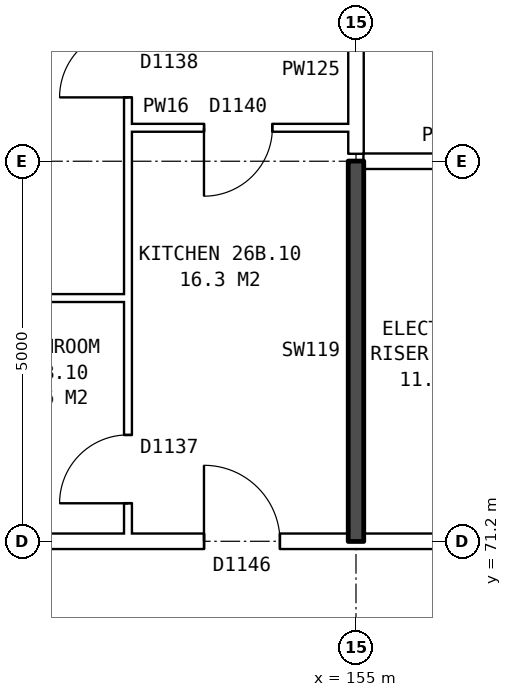
"""IFC4 building model, lengths in metres.
Left out: names, types, materials, properties, quantities, classifications, styles, units other than length and angle.
Written with IfcOpenShell. Run it as: python <this file> out.ifc"""

import sys

from ifc_helpers import new_model, si_unit, direction, frame, frame_2d, origin, place, context, subcontext, project, spatial, rectangle, extrude, element, fill, save


model = new_model("IFC4")
c1 = context("Model", 3, precision=1e-05, world=origin(), true_north=direction((0.0, 1.0)))
c2 = subcontext(c1, "Body", "Model", "MODEL_VIEW")
j1 = project(units=[si_unit("LENGTHUNIT", "METRE"), si_unit("PLANEANGLEUNIT", "RADIAN")], contexts=[c1])
p1 = place(None, origin())
s1 = spatial("IfcSite", under=j1, at=p1, CompositionType="ELEMENT")
p2 = place(p1, origin())
s2 = spatial("IfcBuilding", under=s1, at=p2, CompositionType="ELEMENT")
p3 = place(p2, frame((0.0, 0.0, 96.4)))
s3 = spatial("IfcBuildingStorey", under=s2, at=p3, CompositionType="ELEMENT", Elevation=96.4)
p4 = place(p3, frame((142.76, 71.2, 0.0), z_axis=(0.0, 0.0, 1.0), x_axis=(1.0, 0.0, 0.0)))
e1 = element("IfcWall", 1, at=p4, inside=s3, PredefinedType="PARTITIONING", context=c2, shape_type="SweptSolid", body=[
    extrude(rectangle(XDim=14.48, YDim=0.2, at=frame_2d((7.24, 0.0))), origin(), (0.0, 0.0, 1.0), 2.85),
])
p5 = place(p4, frame((1.12, 0.0, 0.0)))
e2 = element("IfcOpeningElement", 2, at=p5, cuts=e1, PredefinedType="OPENING", context=c2, shape_type="SweptSolid", body=[
    extrude(rectangle(XDim=1.0, YDim=2.1, at=frame_2d((0.5, 1.05))), frame((0.0, 0.11, 0.0), z_axis=(0.0, -1.0, 0.0), x_axis=(1.0, 0.0, 0.0)), (0.0, 0.0, 1.0), 0.22),
])
p6 = place(p4, frame((10.24, 0.0, 0.0)))
e3 = element("IfcOpeningElement", 3, at=p6, cuts=e1, PredefinedType="OPENING", context=c2, shape_type="SweptSolid", body=[
    extrude(rectangle(XDim=1.0, YDim=2.1, at=frame_2d((0.5, 1.05))), frame((0.0, 0.11, 0.0), z_axis=(0.0, -1.0, 0.0), x_axis=(1.0, 0.0, 0.0)), (0.0, 0.0, 1.0), 0.22),
])
p7 = place(p3, frame((146.0, 74.4, 0.0), z_axis=(0.0, 0.0, 1.0), x_axis=(1.0, 0.0, 0.0)))
e4 = element("IfcWall", 4, at=p7, inside=s3, PredefinedType="PARTITIONING", context=c2, shape_type="SweptSolid", body=[
    extrude(rectangle(XDim=6.0, YDim=0.1, at=frame_2d((3.0, 0.0))), origin(), (0.0, 0.0, 1.0), 2.85),
])
p8 = place(p3, frame((155.1, 76.2, 0.0), z_axis=(0.0, 0.0, 1.0), x_axis=(1.0, 0.0, 0.0)))
e5 = element("IfcWall", 5, at=p8, inside=s3, PredefinedType="PARTITIONING", context=c2, shape_type="SweptSolid", body=[
    extrude(rectangle(XDim=2.14, YDim=0.2, at=frame_2d((1.07, 0.0))), origin(), (0.0, 0.0, 1.0), 2.85),
])
p9 = place(p3, frame((152.0, 76.64, 0.0), z_axis=(0.0, 0.0, 1.0), x_axis=(1.0, 0.0, 0.0)))
e6 = element("IfcWall", 6, at=p9, inside=s3, PredefinedType="PARTITIONING", context=c2, shape_type="SweptSolid", body=[
    extrude(rectangle(XDim=2.9, YDim=0.1, at=frame_2d((1.45, 0.0))), origin(), (0.0, 0.0, 1.0), 2.85),
])
p10 = place(p9, frame((1.0, 0.0, 0.0)))
e7 = element("IfcOpeningElement", 7, at=p10, cuts=e6, PredefinedType="OPENING", context=c2, shape_type="SweptSolid", body=[
    extrude(rectangle(XDim=0.9, YDim=2.1, at=frame_2d((0.45, 1.05))), frame((0.0, 0.06, 0.0), z_axis=(0.0, -1.0, 0.0), x_axis=(1.0, 0.0, 0.0)), (0.0, 0.0, 1.0), 0.12),
])
p11 = place(p3, frame((152.0, 71.3, 0.0), z_axis=(0.0, 0.0, 1.0), x_axis=(0.0, 1.0, 0.0)))
e8 = element("IfcWall", 8, at=p11, inside=s3, PredefinedType="PARTITIONING", context=c2, shape_type="SweptSolid", body=[
    extrude(rectangle(XDim=14.34, YDim=0.1, at=frame_2d((7.17, 0.0))), origin(), (0.0, 0.0, 1.0), 2.85),
])
p12 = place(p11, frame((5.74, 0.0, 0.0)))
e9 = element("IfcOpeningElement", 9, at=p12, cuts=e8, PredefinedType="OPENING", context=c2, shape_type="SweptSolid", body=[
    extrude(rectangle(XDim=0.9, YDim=2.1, at=frame_2d((0.45, 1.05))), frame((0.0, 0.06, 0.0), z_axis=(0.0, -1.0, 0.0), x_axis=(1.0, 0.0, 0.0)), (0.0, 0.0, 1.0), 0.12),
])
p13 = place(p11, frame((0.4, 0.0, 0.0)))
e10 = element("IfcOpeningElement", 10, at=p13, cuts=e8, PredefinedType="OPENING", context=c2, shape_type="SweptSolid", body=[
    extrude(rectangle(XDim=0.9, YDim=2.1, at=frame_2d((0.45, 1.05))), frame((0.0, 0.06, 0.0), z_axis=(0.0, -1.0, 0.0), x_axis=(1.0, 0.0, 0.0)), (0.0, 0.0, 1.0), 0.12),
])
p14 = place(p3, frame((155.0, 71.2, 0.0), z_axis=(0.0, 0.0, 1.0), x_axis=(0.0, 1.0, 0.0)))
e11 = element("IfcWall", 11, at=p14, inside=s3, PredefinedType="SOLIDWALL", context=c2, shape_type="SweptSolid", body=[
    extrude(rectangle(XDim=5.0, YDim=0.2, at=frame_2d((2.5, 0.0))), origin(), (0.0, 0.0, 1.0), 2.85),
])
p15 = place(p3, frame((155.0, 76.3, 0.0), z_axis=(0.0, 0.0, 1.0), x_axis=(0.0, 1.0, 0.0)))
e12 = element("IfcWall", 12, at=p15, inside=s3, PredefinedType="PARTITIONING", context=c2, shape_type="SweptSolid", body=[
    extrude(rectangle(XDim=2.2, YDim=0.2, at=frame_2d((1.1, 0.0))), origin(), (0.0, 0.0, 1.0), 2.85),
])
p16 = place(p12, origin())
e13 = element("IfcDoor", 13, at=p16, inside=s3, OperationType="SINGLE_SWING_LEFT", PredefinedType="DOOR", context=c2, shape_type="SweptSolid", body=[
    extrude(rectangle(XDim=0.9, YDim=2.1, at=frame_2d((0.45, 1.05))), frame((0.0, 0.025, 0.0), z_axis=(0.0, -1.0, 0.0), x_axis=(1.0, 0.0, 0.0)), (0.0, 0.0, 1.0), 0.05),
])
fill(e9, e13)
p17 = place(p6, origin())
e14 = element("IfcDoor", 14, at=p17, inside=s3, OperationType="SINGLE_SWING_LEFT", PredefinedType="DOOR", context=c2, shape_type="SweptSolid", body=[
    extrude(rectangle(XDim=1.0, YDim=2.1, at=frame_2d((0.5, 1.05))), frame((0.0, 0.025, 0.0), z_axis=(0.0, -1.0, 0.0), x_axis=(1.0, 0.0, 0.0)), (0.0, 0.0, 1.0), 0.05),
])
fill(e3, e14)
p18 = place(p10, frame((0.9, 0.0, 0.0), z_axis=(0.0, 0.0, 1.0), x_axis=(-1.0, 0.0, 0.0)))
e15 = element("IfcDoor", 15, at=p18, inside=s3, OperationType="SINGLE_SWING_RIGHT", PredefinedType="DOOR", context=c2, shape_type="SweptSolid", body=[
    extrude(rectangle(XDim=0.9, YDim=2.1, at=frame_2d((0.45, 1.05))), frame((0.0, 0.025, 0.0), z_axis=(0.0, -1.0, 0.0), x_axis=(1.0, 0.0, 0.0)), (0.0, 0.0, 1.0), 0.05),
])
fill(e7, e15)
p19 = place(p13, origin())
e16 = element("IfcDoor", 16, at=p19, inside=s3, OperationType="SINGLE_SWING_LEFT", PredefinedType="DOOR", context=c2, shape_type="SweptSolid", body=[
    extrude(rectangle(XDim=0.9, YDim=2.1, at=frame_2d((0.45, 1.05))), frame((0.0, 0.025, 0.0), z_axis=(0.0, -1.0, 0.0), x_axis=(1.0, 0.0, 0.0)), (0.0, 0.0, 1.0), 0.05),
])
fill(e10, e16)
save(model, sys.argv[1])
